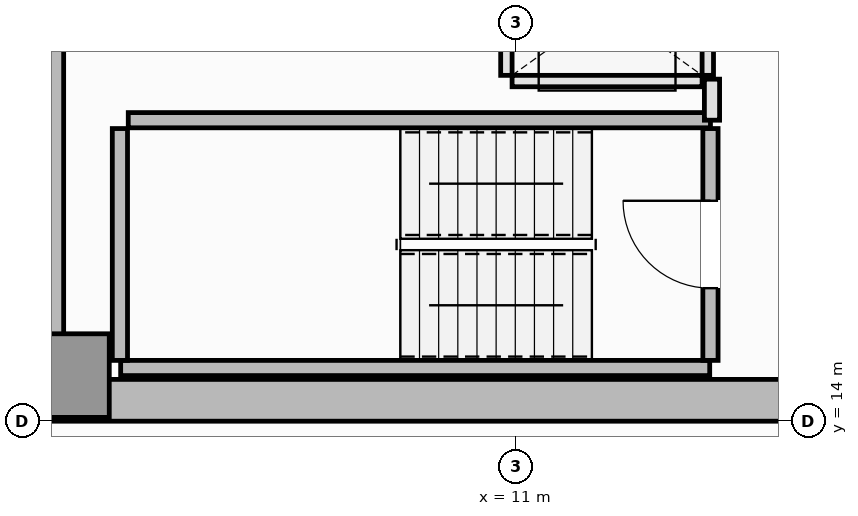
"""IFC4 building model, lengths in metres.
Left out: names, types, materials, properties, quantities, classifications, styles, units other than length and angle.
Written with IfcOpenShell. Run it as: python <this file> out.ifc"""

import sys

from ifc_helpers import new_model, si_unit, direction, frame, frame_2d, origin, origin_2d, place, context, subcontext, project, spatial, rectangle, extrude, element, fill, save


model = new_model("IFC4")
c1 = context("Model", 3, precision=1e-05, world=origin(), true_north=direction((0.0, 1.0)))
c2 = subcontext(c1, "Body", "Model", "MODEL_VIEW")
j1 = project(units=[si_unit("LENGTHUNIT", "METRE"), si_unit("PLANEANGLEUNIT", "RADIAN")], contexts=[c1])
p1 = place(None, origin())
s1 = spatial("IfcSite", under=j1, at=p1, CompositionType="ELEMENT")
p2 = place(p1, origin())
s2 = spatial("IfcBuilding", under=s1, at=p2, CompositionType="ELEMENT")
p3 = place(p2, frame((0.0, 0.0, 241.3)))
s3 = spatial("IfcBuildingStorey", under=s2, at=p3, CompositionType="ELEMENT", Elevation=241.3)
p4 = place(p3, frame((4.5, 14.275, 0.0), z_axis=(0.0, 0.0, 1.0), x_axis=(1.0, 0.0, 0.0)))
e1 = element("IfcWall", 1, at=p4, inside=s3, PredefinedType="SHEAR", context=c2, shape_type="SweptSolid", body=[
    extrude(rectangle(XDim=13.5, YDim=0.55, at=frame_2d((6.75, 0.0))), origin(), (0.0, 0.0, 1.0), 3.55),
])
p5 = place(p3, frame((4.775, 14.55, 0.0), z_axis=(0.0, 0.0, 1.0), x_axis=(0.0, 1.0, 0.0)))
e2 = element("IfcWall", 2, at=p5, inside=s3, PredefinedType="SHEAR", context=c2, shape_type="SweptSolid", body=[
    extrude(rectangle(XDim=21.4, YDim=0.55, at=frame_2d((10.7, 0.0))), origin(), (0.0, 0.0, 1.0), 3.55),
])
p6 = place(p3, frame((5.1, 14.6, 0.0), z_axis=(0.0, 0.0, 1.0), x_axis=(1.0, 0.0, 0.0)))
e3 = element("IfcColumn", 3, at=p6, inside=s3, PredefinedType="PILASTER", context=c2, shape_type="SweptSolid", body=[
    extrude(rectangle(XDim=1.1, YDim=1.1, at=origin_2d()), origin(), (0.0, 0.0, 1.0), 3.55),
])
p7 = place(p3, frame((5.8, 14.7, 0.0), z_axis=(0.0, 0.0, 1.0), x_axis=(1.0, 0.0, 0.0)))
e4 = element("IfcWall", 4, at=p7, inside=s3, PredefinedType="SOLIDWALL", context=c2, shape_type="SweptSolid", body=[
    extrude(rectangle(XDim=7.75, YDim=0.2, at=frame_2d((3.875, 0.0))), origin(), (0.0, 0.0, 1.0), 3.55),
])
p8 = place(p3, frame((5.79, 14.8, 0.0), z_axis=(0.0, 0.0, 1.0), x_axis=(0.0, 1.0, 0.0)))
e5 = element("IfcWall", 5, at=p8, inside=s3, PredefinedType="SOLIDWALL", context=c2, shape_type="SweptSolid", body=[
    extrude(rectangle(XDim=3.05, YDim=0.2, at=frame_2d((1.525, 0.0))), origin(), (0.0, 0.0, 1.0), 3.55),
])
p9 = place(p3, frame((5.9, 17.96, 0.0), z_axis=(0.0, 0.0, 1.0), x_axis=(1.0, 0.0, 0.0)))
e6 = element("IfcWall", 6, at=p9, inside=s3, PredefinedType="SOLIDWALL", context=c2, shape_type="SweptSolid", body=[
    extrude(rectangle(XDim=7.66, YDim=0.2, at=frame_2d((3.83, 0.0))), origin(), (0.0, 0.0, 1.0), 3.55),
])
p10 = place(p3, frame((13.56, 14.8, 0.0), z_axis=(0.0, 0.0, 1.0), x_axis=(0.0, 1.0, 0.0)))
e7 = element("IfcWall", 7, at=p10, inside=s3, PredefinedType="SOLIDWALL", context=c2, shape_type="SweptSolid", body=[
    extrude(rectangle(XDim=3.05, YDim=0.2, at=frame_2d((1.525, 0.0))), origin(), (0.0, 0.0, 1.0), 3.55),
])
p11 = place(p10, frame((0.95, 0.0, 0.0)))
e8 = element("IfcOpeningElement", 8, at=p11, cuts=e7, PredefinedType="OPENING", context=c2, shape_type="SweptSolid", body=[
    extrude(rectangle(XDim=1.15, YDim=2.15, at=frame_2d((0.575, 1.075))), frame((0.0, 0.11, 0.0), z_axis=(0.0, -1.0, 0.0), x_axis=(1.0, 0.0, 0.0)), (0.0, 0.0, 1.0), 0.22),
])
p12 = place(p3, frame((10.95, 18.475, 0.0), z_axis=(0.0, 0.0, 1.0), x_axis=(1.0, 0.0, 0.0)))
e9 = element("IfcWall", 9, at=p12, inside=s3, PredefinedType="PARTITIONING", context=c2, shape_type="SweptSolid", body=[
    extrude(rectangle(XDim=2.5, YDim=0.15, at=frame_2d((1.25, 0.0))), origin(), (0.0, 0.0, 1.0), 3.39),
])
p13 = place(p3, frame((10.875, 18.55, 0.0), z_axis=(0.0, 0.0, 1.0), x_axis=(0.0, 1.0, 0.0)))
e10 = element("IfcWall", 10, at=p13, inside=s3, PredefinedType="PARTITIONING", context=c2, shape_type="SweptSolid", body=[
    extrude(rectangle(XDim=1.8, YDim=0.15, at=frame_2d((0.9, 0.0))), origin(), (0.0, 0.0, 1.0), 3.39),
])
p14 = place(p3, frame((13.525, 18.55, 0.0), z_axis=(0.0, 0.0, 1.0), x_axis=(0.0, 1.0, 0.0)))
e11 = element("IfcWall", 11, at=p14, inside=s3, PredefinedType="PARTITIONING", context=c2, shape_type="SweptSolid", body=[
    extrude(rectangle(XDim=1.8, YDim=0.15, at=frame_2d((0.9, 0.0))), origin(), (0.0, 0.0, 1.0), 3.39),
])
p15 = place(p14, frame((0.35, 0.0, 0.0)))
e12 = element("IfcOpeningElement", 12, at=p15, cuts=e11, PredefinedType="OPENING", context=c2, shape_type="SweptSolid", body=[
    extrude(rectangle(XDim=1.1, YDim=2.2, at=frame_2d((0.55, 1.1))), frame((0.0, 0.085, 0.0), z_axis=(0.0, -1.0, 0.0), x_axis=(1.0, 0.0, 0.0)), (0.0, 0.0, 1.0), 0.17),
])
p16 = place(p3, frame((13.58, 17.96, 0.0), z_axis=(0.0, 0.0, 1.0), x_axis=(0.0, 1.0, 0.0)))
e13 = element("IfcWall", 13, at=p16, inside=s3, PredefinedType="PARTITIONING", context=c2, shape_type="SweptSolid", body=[
    extrude(rectangle(XDim=0.54, YDim=0.2, at=frame_2d((0.27, 0.0))), origin(), (0.0, 0.0, 1.0), 3.39),
])
p17 = place(p11, origin())
e14 = element("IfcDoor", 14, at=p17, inside=s3, OperationType="SINGLE_SWING_RIGHT", PredefinedType="DOOR", context=c2, shape_type="SweptSolid", body=[
    extrude(rectangle(XDim=1.15, YDim=2.15, at=frame_2d((0.575, 1.075))), frame((0.0, 0.025, 0.0), z_axis=(0.0, -1.0, 0.0), x_axis=(1.0, 0.0, 0.0)), (0.0, 0.0, 1.0), 0.05),
])
fill(e8, e14)
save(model, sys.argv[1])
